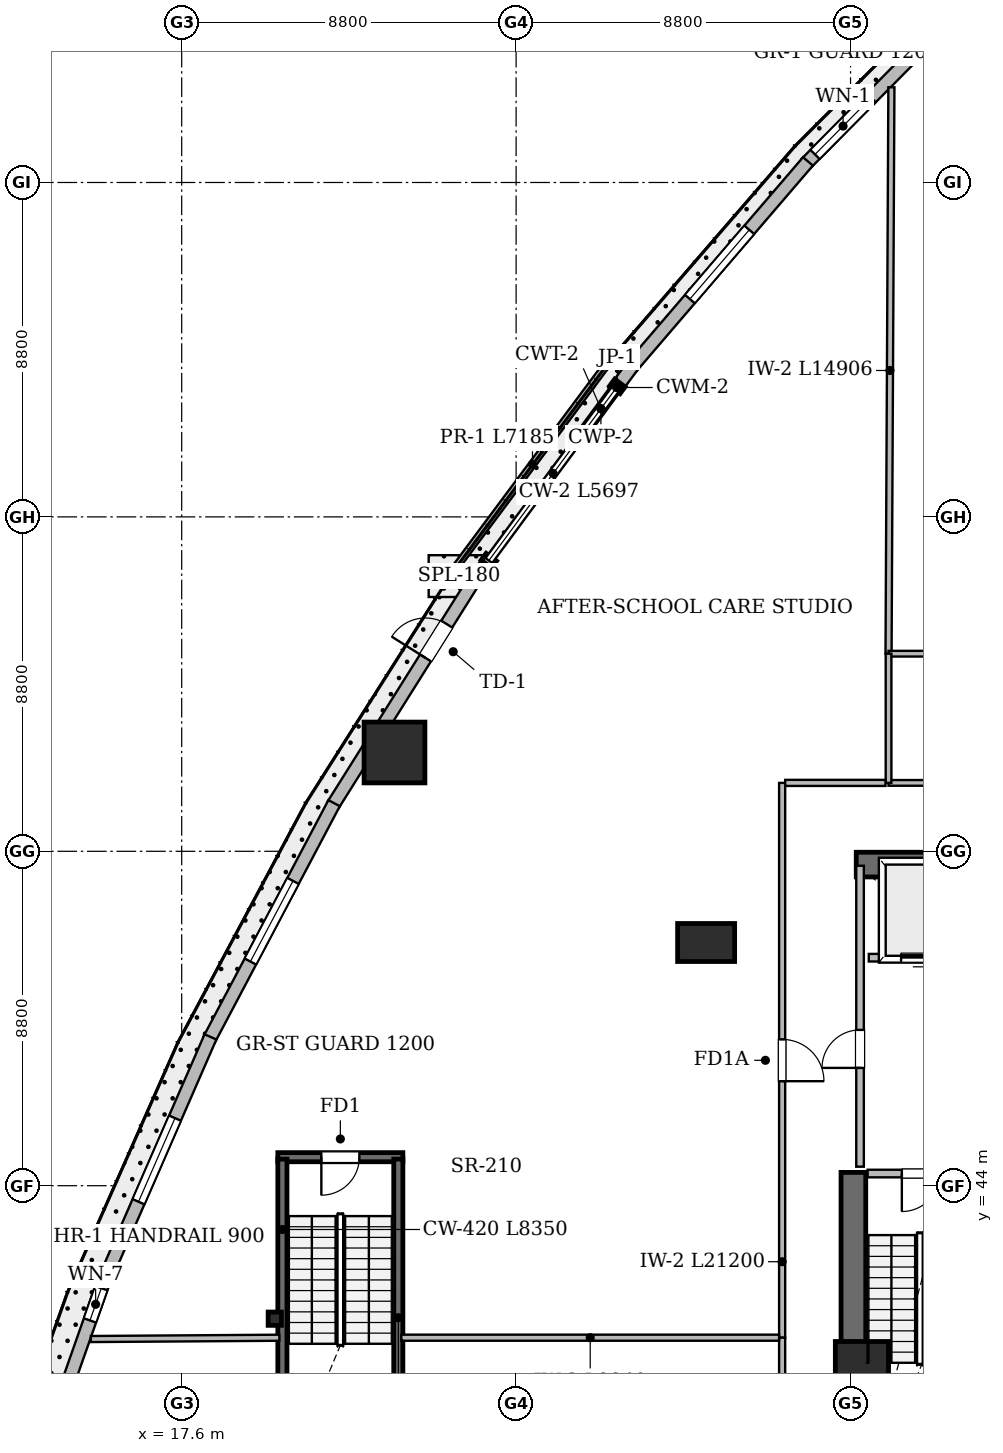
"""IFC4 building model, lengths in metres.
Left out: names, types, materials, properties, quantities, classifications, styles, units other than length and angle.
Written with IfcOpenShell. Run it as: python <this file> out.ifc"""

import sys

from ifc_helpers import new_model, si_unit, direction, frame, frame_2d, origin, origin_2d, place, context, subcontext, project, spatial, rectangle, i_section, extrude, element, fill, save


model = new_model("IFC4")
c1 = context("Model", 3, precision=1e-05, world=origin(), true_north=direction((0.0, 1.0)))
c2 = subcontext(c1, "Body", "Model", "MODEL_VIEW")
j1 = project(units=[si_unit("LENGTHUNIT", "METRE"), si_unit("PLANEANGLEUNIT", "RADIAN")], contexts=[c1])
p1 = place(None, origin())
s1 = spatial("IfcSite", under=j1, at=p1, CompositionType="ELEMENT")
p2 = place(p1, origin())
s2 = spatial("IfcBuilding", under=s1, at=p2, CompositionType="ELEMENT")
p3 = place(p2, frame((0.0, 0.0, 9.6)))
s3 = spatial("IfcBuildingStorey", under=s2, at=p3, CompositionType="ELEMENT", Elevation=9.6)
p4 = place(p3, frame((35.35, 52.45, 0.0), z_axis=(0.0, 0.0, 1.0), x_axis=(1.0, 0.0, 0.0)))
e1 = element("IfcWall", 1, at=p4, inside=s3, PredefinedType="SHEAR", context=c2, shape_type="SweptSolid", body=[
    extrude(rectangle(XDim=17.3, YDim=0.65, at=frame_2d((8.65, 0.0))), origin(), (0.0, 0.0, 1.0), 4.5),
])
p5 = place(p3, frame((35.275, 34.95, 0.0), z_axis=(0.0, 0.0, 1.0), x_axis=(0.0, 1.0, 0.0)))
e2 = element("IfcWall", 2, at=p5, inside=s3, PredefinedType="SHEAR", context=c2, shape_type="SweptSolid", body=[
    extrude(rectangle(XDim=9.4, YDim=0.65, at=frame_2d((4.7, 0.0))), origin(), (0.0, 0.0, 1.0), 4.5),
])
p6 = place(p3, frame((35.5, 39.2, 0.0), z_axis=(0.0, 0.0, 1.0), x_axis=(1.0, 0.0, 0.0)))
e3 = element("IfcColumn", 3, at=p6, inside=s3, PredefinedType="COLUMN", context=c2, shape_type="SweptSolid", body=[
    extrude(rectangle(XDim=1.4, YDim=1.4, at=origin_2d()), origin(), (0.0, 0.0, 1.0), 4.8),
])
p7 = place(p3, frame((31.4, 50.4, 0.0), z_axis=(0.0, 0.0, 1.0), x_axis=(1.0, 0.0, 0.0)))
e4 = element("IfcColumn", 4, at=p7, inside=s3, PredefinedType="COLUMN", context=c2, shape_type="SweptSolid", body=[
    extrude(rectangle(XDim=1.5, YDim=1.0, at=origin_2d()), origin(), (0.0, 0.0, 1.0), 4.8),
])
p8 = place(p3, frame((23.2, 55.4, 0.0), z_axis=(0.0, 0.0, 1.0), x_axis=(1.0, 0.0, 0.0)))
e5 = element("IfcColumn", 5, at=p8, inside=s3, PredefinedType="COLUMN", context=c2, shape_type="SweptSolid", body=[
    extrude(rectangle(XDim=1.6, YDim=1.6, at=origin_2d()), origin(), (0.0, 0.0, 1.0), 4.8),
])
p9 = place(p3, frame((20.05, 40.5, 0.0), z_axis=(0.0, 0.0, 1.0), x_axis=(1.0, 0.0, 0.0)))
e6 = element("IfcColumn", 6, at=p9, inside=s3, PredefinedType="PILASTER", context=c2, shape_type="SweptSolid", body=[
    extrude(i_section(OverallWidth=0.35, OverallDepth=0.35, WebThickness=0.012, FlangeThickness=0.019, FilletRadius=0.02, at=origin_2d()), origin(), (0.0, 0.0, 1.0), 4.8),
])
p10 = place(p3, frame((39.138, 76.062, 0.0), z_axis=(0.0, 0.0, 1.0), x_axis=(-0.703481917412, -0.71071315724, 0.0)))
e7 = element("IfcWall", 7, at=p10, inside=s3, PredefinedType="SOLIDWALL", context=c2, shape_type="SweptSolid", body=[
    extrude(rectangle(XDim=7.259, YDim=0.34, at=frame_2d((3.629, 0.0))), origin(), (0.0, 0.0, 1.0), 4.5),
])
p11 = place(p10, frame((0.809, 0.0, 0.75)))
e8 = element("IfcOpeningElement", 8, at=p11, cuts=e7, PredefinedType="OPENING", context=c2, shape_type="SweptSolid", body=[
    extrude(rectangle(XDim=2.4, YDim=2.2, at=frame_2d((1.2, 1.1))), frame((0.0, 0.18, 0.0), z_axis=(0.0, -1.0, 0.0), x_axis=(1.0, 0.0, 0.0)), (0.0, 0.0, 1.0), 0.36),
])
p12 = place(p10, frame((4.828, 0.0, 0.8)))
e9 = element("IfcOpeningElement", 9, at=p12, cuts=e7, PredefinedType="OPENING", context=c2, shape_type="SweptSolid", body=[
    extrude(rectangle(XDim=2.1, YDim=1.7, at=frame_2d((1.05, 0.85))), frame((0.0, 0.18, 0.0), z_axis=(0.0, -1.0, 0.0), x_axis=(1.0, 0.0, 0.0)), (0.0, 0.0, 1.0), 0.36),
])
p13 = place(p3, frame((34.079, 70.955, 0.0), z_axis=(0.0, 0.0, 1.0), x_axis=(-0.651033354251, -0.759049123346, 0.0)))
e10 = element("IfcWall", 10, at=p13, inside=s3, PredefinedType="SOLIDWALL", context=c2, shape_type="SweptSolid", body=[
    extrude(rectangle(XDim=7.145, YDim=0.34, at=frame_2d((3.572, 0.0))), origin(), (0.0, 0.0, 1.0), 4.5),
])
p14 = place(p13, frame((2.372, 0.0, 0.75)))
e11 = element("IfcOpeningElement", 11, at=p14, cuts=e10, PredefinedType="OPENING", context=c2, shape_type="SweptSolid", body=[
    extrude(rectangle(XDim=2.4, YDim=2.2, at=frame_2d((1.2, 1.1))), frame((0.0, 0.18, 0.0), z_axis=(0.0, -1.0, 0.0), x_axis=(1.0, 0.0, 0.0)), (0.0, 0.0, 1.0), 0.36),
])
p15 = place(p3, frame((29.472, 65.586, 0.0), z_axis=(0.0, 0.0, 1.0), x_axis=(-0.593777585695, -0.804629218166, 0.0)))
e12 = element("IfcWall", 12, at=p15, inside=s3, PredefinedType="SOLIDWALL", context=c2, shape_type="SweptSolid", body=[
    extrude(rectangle(XDim=0.705, YDim=0.34, at=frame_2d((0.353, 0.0))), origin(), (0.0, 0.0, 1.0), 4.5),
])
p16 = place(p3, frame((25.695, 60.467, 0.0), z_axis=(0.0, 0.0, 1.0), x_axis=(-0.593612202557, -0.804751236703, 0.0)))
e13 = element("IfcWall", 13, at=p16, inside=s3, PredefinedType="SOLIDWALL", context=c2, shape_type="SweptSolid", body=[
    extrude(rectangle(XDim=0.705, YDim=0.34, at=frame_2d((0.353, 0.0))), origin(), (0.0, 0.0, 1.0), 4.5),
])
p17 = place(p3, frame((25.315, 59.957, 0.0), z_axis=(0.0, 0.0, 1.0), x_axis=(-0.532076922899, -0.846696018721, 0.0)))
e14 = element("IfcWall", 14, at=p17, inside=s3, PredefinedType="SOLIDWALL", context=c2, shape_type="SweptSolid", body=[
    extrude(rectangle(XDim=7.028, YDim=0.34, at=frame_2d((3.514, 0.0))), origin(), (0.0, 0.0, 1.0), 4.5),
])
p18 = place(p17, frame((1.392, 0.0, 0.0)))
e15 = element("IfcOpeningElement", 15, at=p18, cuts=e14, PredefinedType="OPENING", context=c2, shape_type="SweptSolid", body=[
    extrude(rectangle(XDim=1.05, YDim=2.15, at=frame_2d((0.525, 1.075))), frame((0.0, 0.18, 0.0), z_axis=(0.0, -1.0, 0.0), x_axis=(1.0, 0.0, 0.0)), (0.0, 0.0, 1.0), 0.36),
])
p19 = place(p3, frame((21.611, 54.067, 0.0), z_axis=(0.0, 0.0, 1.0), x_axis=(-0.467220437821, -0.884140861222, 0.0)))
e16 = element("IfcWall", 16, at=p19, inside=s3, PredefinedType="SOLIDWALL", context=c2, shape_type="SweptSolid", body=[
    extrude(rectangle(XDim=7.028, YDim=0.34, at=frame_2d((3.514, 0.0))), origin(), (0.0, 0.0, 1.0), 4.5),
])
p20 = place(p19, frame((2.314, 0.0, 0.75)))
e17 = element("IfcOpeningElement", 17, at=p20, cuts=e16, PredefinedType="OPENING", context=c2, shape_type="SweptSolid", body=[
    extrude(rectangle(XDim=2.4, YDim=2.2, at=frame_2d((1.2, 1.1))), frame((0.0, 0.18, 0.0), z_axis=(0.0, -1.0, 0.0), x_axis=(1.0, 0.0, 0.0)), (0.0, 0.0, 1.0), 0.36),
])
p21 = place(p3, frame((18.357, 47.916, 0.0), z_axis=(0.0, 0.0, 1.0), x_axis=(-0.400068444927, -0.916485264133, 0.0)))
e18 = element("IfcWall", 18, at=p21, inside=s3, PredefinedType="SOLIDWALL", context=c2, shape_type="SweptSolid", body=[
    extrude(rectangle(XDim=7.067, YDim=0.34, at=frame_2d((3.534, 0.0))), origin(), (0.0, 0.0, 1.0), 4.5),
])
p22 = place(p21, frame((2.333, 0.0, 0.75)))
e19 = element("IfcOpeningElement", 19, at=p22, cuts=e18, PredefinedType="OPENING", context=c2, shape_type="SweptSolid", body=[
    extrude(rectangle(XDim=2.4, YDim=2.2, at=frame_2d((1.2, 1.1))), frame((0.0, 0.18, 0.0), z_axis=(0.0, -1.0, 0.0), x_axis=(1.0, 0.0, 0.0)), (0.0, 0.0, 1.0), 0.36),
])
p23 = place(p3, frame((15.556, 41.504, 0.0), z_axis=(0.0, 0.0, 1.0), x_axis=(-0.331818926914, -0.943343097575, 0.0)))
e20 = element("IfcWall", 20, at=p23, inside=s3, PredefinedType="SOLIDWALL", context=c2, shape_type="SweptSolid", body=[
    extrude(rectangle(XDim=7.144, YDim=0.34, at=frame_2d((3.572, 0.0))), origin(), (0.0, 0.0, 1.0), 4.5),
])
p24 = place(p23, frame((0.213, 0.0, 0.78)))
e21 = element("IfcOpeningElement", 21, at=p24, cuts=e20, PredefinedType="OPENING", context=c2, shape_type="SweptSolid", body=[
    extrude(rectangle(XDim=0.9, YDim=1.5, at=frame_2d((0.45, 0.75))), frame((0.0, 0.18, 0.0), z_axis=(0.0, -1.0, 0.0), x_axis=(1.0, 0.0, 0.0)), (0.0, 0.0, 1.0), 0.36),
])
p25 = place(p23, frame((3.276, 0.0, 0.75)))
e22 = element("IfcOpeningElement", 22, at=p25, cuts=e20, PredefinedType="OPENING", context=c2, shape_type="SweptSolid", body=[
    extrude(rectangle(XDim=2.4, YDim=2.2, at=frame_2d((1.2, 1.1))), frame((0.0, 0.18, 0.0), z_axis=(0.0, -1.0, 0.0), x_axis=(1.0, 0.0, 0.0)), (0.0, 0.0, 1.0), 0.36),
])
p26 = place(p3, frame((28.976, 65.866, 0.0), z_axis=(0.0, 0.0, 1.0), x_axis=(-0.597196383066, -0.802095056744, 0.0)))
e23 = element("IfcWall", 23, at=p26, inside=s3, PredefinedType="PARAPET", context=c2, shape_type="SweptSolid", body=[
    extrude(rectangle(XDim=7.185, YDim=0.18, at=frame_2d((3.592, 0.0))), origin(), (0.0, 0.0, 1.0), 0.45),
])
p27 = place(p3, frame((20.13, 44.75, 0.0), z_axis=(0.0, 0.0, 1.0), x_axis=(1.0, 0.0, 0.0)))
e24 = element("IfcWall", 24, at=p27, inside=s3, PredefinedType="SHEAR", context=c2, shape_type="SweptSolid", body=[
    extrude(rectangle(XDim=3.29, YDim=0.24, at=frame_2d((1.645, 0.0))), origin(), (0.0, 0.0, 1.0), 4.5),
])
p28 = place(p27, frame((1.145, 0.0, 0.0)))
e25 = element("IfcOpeningElement", 25, at=p28, cuts=e24, PredefinedType="OPENING", context=c2, shape_type="SweptSolid", body=[
    extrude(rectangle(XDim=1.0, YDim=2.15, at=frame_2d((0.5, 1.075))), frame((0.0, 0.13, 0.0), z_axis=(0.0, -1.0, 0.0), x_axis=(1.0, 0.0, 0.0)), (0.0, 0.0, 1.0), 0.26),
])
for number, where, z_axis, x_axis in (
    (26, (20.25, 36.35, 0.0), (0.0, 0.0, 1.0), (0.0, 1.0, 0.0)),
    (27, (23.3, 36.35, 0.0), (0.0, 0.0, 1.0), (0.0, 1.0, 0.0)),
):
    element("IfcWall", number, at=place(p3, frame(where, z_axis=z_axis, x_axis=x_axis)), inside=s3, PredefinedType="SHEAR", context=c2, shape_type="SweptSolid", body=[
        extrude(rectangle(XDim=8.35, YDim=0.24, at=frame_2d((4.175, 0.0))), origin(), (0.0, 0.0, 1.0), 4.5),
    ])
p29 = place(p3, frame((33.4, 54.6, 0.0), z_axis=(0.0, 0.0, 1.0), x_axis=(0.0, -1.0, 0.0)))
e28 = element("IfcWall", 28, at=p29, inside=s3, PredefinedType="SOLIDWALL", context=c2, shape_type="SweptSolid", body=[
    extrude(rectangle(XDim=14.6, YDim=0.16, at=frame_2d((7.3, 0.0))), origin(), (0.0, 0.0, 1.0), 3.588),
])
p30 = place(p29, frame((6.75, 0.0, 0.0)))
e29 = element("IfcOpeningElement", 29, at=p30, cuts=e28, PredefinedType="OPENING", context=c2, shape_type="SweptSolid", body=[
    extrude(rectangle(XDim=1.1, YDim=2.15, at=frame_2d((0.55, 1.075))), frame((0.0, 0.09, 0.0), z_axis=(0.0, -1.0, 0.0), x_axis=(1.0, 0.0, 0.0)), (0.0, 0.0, 1.0), 0.18),
])
p31 = place(p3, frame((35.45, 44.5, 0.0), z_axis=(0.0, 0.0, 1.0), x_axis=(0.0, 1.0, 0.0)))
e30 = element("IfcWall", 30, at=p31, inside=s3, PredefinedType="SOLIDWALL", context=c2, shape_type="SweptSolid", body=[
    extrude(rectangle(XDim=7.92, YDim=0.2, at=frame_2d((3.96, 0.0))), origin(), (0.0, 0.0, 1.0), 4.5),
])
p32 = place(p31, frame((2.6, 0.0, 0.0)))
e31 = element("IfcOpeningElement", 31, at=p32, cuts=e30, PredefinedType="OPENING", context=c2, shape_type="SweptSolid", body=[
    extrude(rectangle(XDim=1.0, YDim=2.15, at=frame_2d((0.5, 1.075))), frame((0.0, 0.11, 0.0), z_axis=(0.0, -1.0, 0.0), x_axis=(1.0, 0.0, 0.0)), (0.0, 0.0, 1.0), 0.22),
])
p33 = place(p3, frame((33.4, 40.0, 0.0), z_axis=(0.0, 0.0, 1.0), x_axis=(0.0, -1.0, 0.0)))
e32 = element("IfcWall", 32, at=p33, inside=s3, PredefinedType="SOLIDWALL", context=c2, shape_type="SweptSolid", body=[
    extrude(rectangle(XDim=6.6, YDim=0.16, at=frame_2d((3.3, 0.0))), origin(), (0.0, 0.0, 1.0), 3.588),
])
p34 = place(p33, frame((2.75, 0.0, 0.0)))
e33 = element("IfcOpeningElement", 33, at=p34, cuts=e32, PredefinedType="OPENING", context=c2, shape_type="SweptSolid", body=[
    extrude(rectangle(XDim=1.1, YDim=2.15, at=frame_2d((0.55, 1.075))), frame((0.0, 0.09, 0.0), z_axis=(0.0, -1.0, 0.0), x_axis=(1.0, 0.0, 0.0)), (0.0, 0.0, 1.0), 0.18),
])
p35 = place(p3, frame((40.0, 54.6, 0.0), z_axis=(0.0, 0.0, 1.0), x_axis=(-1.0, 0.0, 0.0)))
e34 = element("IfcWall", 34, at=p35, inside=s3, PredefinedType="PLUMBINGWALL", context=c2, shape_type="SweptSolid", body=[
    extrude(rectangle(XDim=3.8, YDim=0.15, at=frame_2d((1.9, 0.0))), origin(), (0.0, 0.0, 1.0), 3.588),
])
p36 = place(p35, frame((1.45, 0.0, 0.0)))
e35 = element("IfcOpeningElement", 35, at=p36, cuts=e34, PredefinedType="OPENING", context=c2, shape_type="SweptSolid", body=[
    extrude(rectangle(XDim=0.9, YDim=2.1, at=frame_2d((0.45, 1.05))), frame((0.0, 0.085, 0.0), z_axis=(0.0, -1.0, 0.0), x_axis=(1.0, 0.0, 0.0)), (0.0, 0.0, 1.0), 0.17),
])
p37 = place(p3, frame((35.65, 44.32, 0.0), z_axis=(0.0, 0.0, 1.0), x_axis=(1.0, 0.0, 0.0)))
e36 = element("IfcWall", 36, at=p37, inside=s3, PredefinedType="SOLIDWALL", context=c2, shape_type="SweptSolid", body=[
    extrude(rectangle(XDim=2.8, YDim=0.2, at=frame_2d((1.4, 0.0))), origin(), (0.0, 0.0, 1.0), 4.5),
])
p38 = place(p37, frame((0.9, 0.0, 0.0)))
e37 = element("IfcOpeningElement", 37, at=p38, cuts=e36, PredefinedType="OPENING", context=c2, shape_type="SweptSolid", body=[
    extrude(rectangle(XDim=1.0, YDim=2.15, at=frame_2d((0.5, 1.075))), frame((0.0, 0.11, 0.0), z_axis=(0.0, -1.0, 0.0), x_axis=(1.0, 0.0, 0.0)), (0.0, 0.0, 1.0), 0.22),
])
p39 = place(p3, frame((35.68, 50.0, 0.0), z_axis=(0.0, 0.0, 1.0), x_axis=(1.0, 0.0, 0.0)))
e38 = element("IfcWall", 38, at=p39, inside=s3, PredefinedType="SOLIDWALL", context=c2, shape_type="SweptSolid", body=[
    extrude(rectangle(XDim=2.8, YDim=0.2, at=frame_2d((1.4, 0.0))), origin(), (0.0, 0.0, 1.0), 4.5),
])
p40 = place(p39, frame((0.85, 0.0, 0.0)))
e39 = element("IfcOpeningElement", 39, at=p40, cuts=e38, PredefinedType="OPENING", context=c2, shape_type="SweptSolid", body=[
    extrude(rectangle(XDim=1.1, YDim=2.15, at=frame_2d((0.55, 1.075))), frame((0.0, 0.11, 0.0), z_axis=(0.0, -1.0, 0.0), x_axis=(1.0, 0.0, 0.0)), (0.0, 0.0, 1.0), 0.22),
])
p41 = place(p3, frame((36.2, 58.0, 0.0), z_axis=(0.0, 0.0, 1.0), x_axis=(0.00502818965, 0.999987358575, 0.0)))
e40 = element("IfcWall", 40, at=p41, inside=s3, PredefinedType="SOLIDWALL", context=c2, shape_type="SweptSolid", body=[
    extrude(rectangle(XDim=14.906, YDim=0.16, at=frame_2d((7.453, 0.0))), origin(), (0.0, 0.0, 1.0), 3.788),
])
p42 = place(p3, frame((33.32, 40.0, 0.0), z_axis=(0.0, 0.0, 1.0), x_axis=(-1.0, 0.0, 0.0)))
e41 = element("IfcWall", 41, at=p42, inside=s3, PredefinedType="SOLIDWALL", context=c2, shape_type="SweptSolid", body=[
    extrude(rectangle(XDim=9.94, YDim=0.16, at=frame_2d((4.97, 0.0))), origin(), (0.0, 0.0, 1.0), 3.588),
])
p43 = place(p3, frame((20.17, 39.999, 0.0), z_axis=(0.0, 0.0, 1.0), x_axis=(-0.999976595038, -0.006841737877, 0.0)))
e42 = element("IfcWall", 42, at=p43, inside=s3, PredefinedType="SOLIDWALL", context=c2, shape_type="SweptSolid", body=[
    extrude(rectangle(XDim=4.96, YDim=0.16, at=frame_2d((2.48, 0.0))), origin(), (0.0, 0.0, 1.0), 4.5),
])
p44 = place(p3, frame((40.0, 58.0, 0.0), z_axis=(0.0, 0.0, 1.0), x_axis=(-1.0, 0.0, 0.0)))
e43 = element("IfcWall", 43, at=p44, inside=s3, PredefinedType="PLUMBINGWALL", context=c2, shape_type="SweptSolid", body=[
    extrude(rectangle(XDim=3.8, YDim=0.15, at=frame_2d((1.9, 0.0))), origin(), (0.0, 0.0, 1.0), 4.5),
])
p45 = place(p3, frame((36.2, 58.0, 0.0), z_axis=(0.0, 0.0, 1.0), x_axis=(0.0, -1.0, 0.0)))
e44 = element("IfcWall", 44, at=p45, inside=s3, PredefinedType="PLUMBINGWALL", context=c2, shape_type="SweptSolid", body=[
    extrude(rectangle(XDim=3.4, YDim=0.15, at=frame_2d((1.7, 0.0))), origin(), (0.0, 0.0, 1.0), 4.5),
])
p46 = place(p3, frame((36.12, 54.6, 0.0), z_axis=(0.0, 0.0, 1.0), x_axis=(-1.0, 0.0, 0.0)))
e45 = element("IfcWall", 45, at=p46, inside=s3, PredefinedType="SOLIDWALL", context=c2, shape_type="SweptSolid", body=[
    extrude(rectangle(XDim=2.64, YDim=0.16, at=frame_2d((1.32, 0.0))), origin(), (0.0, 0.0, 1.0), 4.5),
])
p47 = place(p11, origin())
e46 = element("IfcWindow", 46, at=p47, inside=s3, PartitioningType="SINGLE_PANEL", PredefinedType="WINDOW", context=c2, shape_type="SweptSolid", body=[
    extrude(rectangle(XDim=2.4, YDim=2.2, at=frame_2d((1.2, 1.1))), frame((0.0, 0.03, 0.0), z_axis=(0.0, -1.0, 0.0), x_axis=(1.0, 0.0, 0.0)), (0.0, 0.0, 1.0), 0.06),
])
fill(e8, e46)
p48 = place(p12, origin())
e47 = element("IfcWindow", 47, at=p48, inside=s3, PartitioningType="SINGLE_PANEL", PredefinedType="WINDOW", context=c2, shape_type="SweptSolid", body=[
    extrude(rectangle(XDim=2.1, YDim=1.7, at=frame_2d((1.05, 0.85))), frame((0.0, 0.03, 0.0), z_axis=(0.0, -1.0, 0.0), x_axis=(1.0, 0.0, 0.0)), (0.0, 0.0, 1.0), 0.06),
])
fill(e9, e47)
p49 = place(p14, origin())
e48 = element("IfcWindow", 48, at=p49, inside=s3, PartitioningType="SINGLE_PANEL", PredefinedType="WINDOW", context=c2, shape_type="SweptSolid", body=[
    extrude(rectangle(XDim=2.4, YDim=2.2, at=frame_2d((1.2, 1.1))), frame((0.0, 0.03, 0.0), z_axis=(0.0, -1.0, 0.0), x_axis=(1.0, 0.0, 0.0)), (0.0, 0.0, 1.0), 0.06),
])
fill(e11, e48)
p50 = place(p18, frame((1.05, 0.0, 0.0), z_axis=(0.0, 0.0, 1.0), x_axis=(-1.0, 0.0, 0.0)))
e49 = element("IfcDoor", 49, at=p50, inside=s3, OperationType="SINGLE_SWING_RIGHT", PredefinedType="DOOR", context=c2, shape_type="SweptSolid", body=[
    extrude(rectangle(XDim=1.05, YDim=2.15, at=frame_2d((0.525, 1.075))), frame((0.0, 0.025, 0.0), z_axis=(0.0, -1.0, 0.0), x_axis=(1.0, 0.0, 0.0)), (0.0, 0.0, 1.0), 0.05),
])
fill(e15, e49)
p51 = place(p20, origin())
e50 = element("IfcWindow", 50, at=p51, inside=s3, PartitioningType="SINGLE_PANEL", PredefinedType="WINDOW", context=c2, shape_type="SweptSolid", body=[
    extrude(rectangle(XDim=2.4, YDim=2.2, at=frame_2d((1.2, 1.1))), frame((0.0, 0.03, 0.0), z_axis=(0.0, -1.0, 0.0), x_axis=(1.0, 0.0, 0.0)), (0.0, 0.0, 1.0), 0.06),
])
fill(e17, e50)
p52 = place(p22, origin())
e51 = element("IfcWindow", 51, at=p52, inside=s3, PartitioningType="SINGLE_PANEL", PredefinedType="WINDOW", context=c2, shape_type="SweptSolid", body=[
    extrude(rectangle(XDim=2.4, YDim=2.2, at=frame_2d((1.2, 1.1))), frame((0.0, 0.03, 0.0), z_axis=(0.0, -1.0, 0.0), x_axis=(1.0, 0.0, 0.0)), (0.0, 0.0, 1.0), 0.06),
])
fill(e19, e51)
p53 = place(p24, origin())
e52 = element("IfcWindow", 52, at=p53, inside=s3, PartitioningType="SINGLE_PANEL", PredefinedType="WINDOW", context=c2, shape_type="SweptSolid", body=[
    extrude(rectangle(XDim=0.9, YDim=1.5, at=frame_2d((0.45, 0.75))), frame((0.0, 0.03, 0.0), z_axis=(0.0, -1.0, 0.0), x_axis=(1.0, 0.0, 0.0)), (0.0, 0.0, 1.0), 0.06),
])
fill(e21, e52)
p54 = place(p28, frame((1.0, 0.0, 0.0), z_axis=(0.0, 0.0, 1.0), x_axis=(-1.0, 0.0, 0.0)))
e53 = element("IfcDoor", 53, at=p54, inside=s3, OperationType="SINGLE_SWING_LEFT", PredefinedType="DOOR", context=c2, shape_type="SweptSolid", body=[
    extrude(rectangle(XDim=1.0, YDim=2.15, at=frame_2d((0.5, 1.075))), frame((0.0, 0.025, 0.0), z_axis=(0.0, -1.0, 0.0), x_axis=(1.0, 0.0, 0.0)), (0.0, 0.0, 1.0), 0.05),
])
fill(e25, e53)
p55 = place(p38, frame((1.0, 0.0, 0.0), z_axis=(0.0, 0.0, 1.0), x_axis=(-1.0, 0.0, 0.0)))
e54 = element("IfcDoor", 54, at=p55, inside=s3, OperationType="SINGLE_SWING_LEFT", PredefinedType="DOOR", context=c2, shape_type="SweptSolid", body=[
    extrude(rectangle(XDim=1.0, YDim=2.15, at=frame_2d((0.5, 1.075))), frame((0.0, 0.025, 0.0), z_axis=(0.0, -1.0, 0.0), x_axis=(1.0, 0.0, 0.0)), (0.0, 0.0, 1.0), 0.05),
])
fill(e37, e54)
p56 = place(p32, origin())
e55 = element("IfcDoor", 55, at=p56, inside=s3, OperationType="SINGLE_SWING_LEFT", PredefinedType="DOOR", context=c2, shape_type="SweptSolid", body=[
    extrude(rectangle(XDim=1.0, YDim=2.15, at=frame_2d((0.5, 1.075))), frame((0.0, 0.025, 0.0), z_axis=(0.0, -1.0, 0.0), x_axis=(1.0, 0.0, 0.0)), (0.0, 0.0, 1.0), 0.05),
])
fill(e31, e55)
p57 = place(p40, origin())
e56 = element("IfcDoor", 56, at=p57, inside=s3, OperationType="SLIDING_TO_LEFT", PredefinedType="DOOR", context=c2, shape_type="SweptSolid", body=[
    extrude(rectangle(XDim=1.1, YDim=2.15, at=frame_2d((0.55, 1.075))), frame((0.0, 0.025, 0.0), z_axis=(0.0, -1.0, 0.0), x_axis=(1.0, 0.0, 0.0)), (0.0, 0.0, 1.0), 0.05),
])
fill(e39, e56)
p58 = place(p30, origin())
e57 = element("IfcDoor", 57, at=p58, inside=s3, OperationType="SINGLE_SWING_RIGHT", PredefinedType="DOOR", context=c2, shape_type="SweptSolid", body=[
    extrude(rectangle(XDim=1.1, YDim=2.15, at=frame_2d((0.55, 1.075))), frame((0.0, 0.025, 0.0), z_axis=(0.0, -1.0, 0.0), x_axis=(1.0, 0.0, 0.0)), (0.0, 0.0, 1.0), 0.05),
])
fill(e29, e57)
save(model, sys.argv[1])
